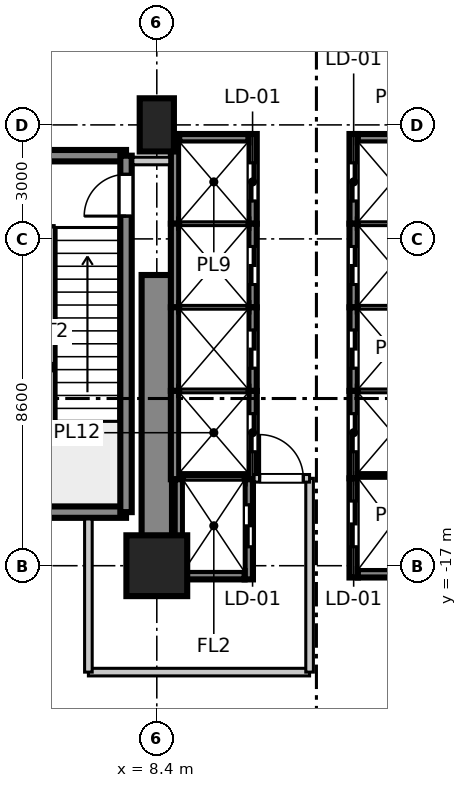
"""IFC4 building model, lengths in metres.
Left out: names, types, materials, properties, quantities, classifications, styles, units other than length and angle.
Written with IfcOpenShell. Run it as: python <this file> out.ifc"""

import sys

from ifc_helpers import new_model, si_unit, direction, frame, frame_2d, origin, origin_2d, place, context, subcontext, project, spatial, rectangle, extrude, source, transform, mapped, element, fill, save


model = new_model("IFC4")
c1 = context("Model", 3, precision=1e-05, world=origin(), true_north=direction((0.0, 1.0)))
c2 = subcontext(c1, "Body", "Model", "MODEL_VIEW")
j1 = project(units=[si_unit("LENGTHUNIT", "METRE"), si_unit("PLANEANGLEUNIT", "RADIAN")], contexts=[c1])
p1 = place(None, origin())
s1 = spatial("IfcSite", under=j1, at=p1, CompositionType="ELEMENT")
p2 = place(p1, origin())
s2 = spatial("IfcBuilding", under=s1, at=p2, CompositionType="ELEMENT")
p3 = place(p2, origin())
s3 = spatial("IfcBuildingStorey", under=s2, at=p3, CompositionType="ELEMENT", Elevation=0.0)
m1 = source(origin(), c2, "Body", "SweptSolid", [
    extrude(rectangle(XDim=1.6, YDim=1.6, at=origin_2d()), origin(), (0.0, 0.0, 1.0), 5.355),
])
p4 = place(p3, frame((8.4, -17.0, 0.0), z_axis=(0.0, 0.0, 1.0), x_axis=(1.0, 0.0, 0.0)))
e1 = element("IfcColumn", 1, at=p4, inside=s3, PredefinedType="COLUMN", context=c2, shape_type="MappedRepresentation", body=[
    mapped(m1, transform((0.0, 0.0, 0.0), scale=1.0)),
])
m2 = source(origin(), c2, "Body", "SweptSolid", [
    extrude(rectangle(XDim=0.9, YDim=1.4, at=origin_2d()), origin(), (0.0, 0.0, 1.0), 5.355),
])
p5 = place(p3, frame((8.4, -5.4, 0.0), z_axis=(0.0, 0.0, 1.0), x_axis=(1.0, 0.0, 0.0)))
e2 = element("IfcColumn", 2, at=p5, inside=s3, PredefinedType="PILASTER", context=c2, shape_type="MappedRepresentation", body=[
    mapped(m2, transform((0.0, 0.0, 0.0), scale=1.0)),
])
m3 = source(origin(), c2, "Body", "SweptSolid", [
    extrude(rectangle(XDim=7.65, YDim=0.8, at=frame_2d((3.825, 0.0))), origin(), (0.0, 0.0, 1.0), 5.08),
])
p6 = place(p3, frame((8.4, -17.0, 0.0), z_axis=(0.0, 0.0, 1.0), x_axis=(0.0, 1.0, 0.0)))
e3 = element("IfcWall", 3, at=p6, inside=s3, PredefinedType="SHEAR", context=c2, shape_type="MappedRepresentation", body=[
    mapped(m3, transform((0.0, 0.0, 0.0), scale=1.0)),
])
m4 = source(origin(), c2, "Body", "SweptSolid", [
    extrude(rectangle(XDim=3.98, YDim=0.3, at=frame_2d((1.99, 0.0))), origin(), (0.0, 0.0, 1.0), 5.08),
])
for number, where, z_axis, x_axis in (
    (4, (3.61, -15.59, 0.0), (0.0, 0.0, 1.0), (1.0, 0.0, 0.0)),
    (5, (3.61, -6.21, 0.0), (0.0, 0.0, 1.0), (1.0, 0.0, 0.0)),
):
    element("IfcWall", number, at=place(p3, frame(where, z_axis=z_axis, x_axis=x_axis)), inside=s3, PredefinedType="SHEAR", context=c2, shape_type="MappedRepresentation", body=[
        mapped(m4, transform((0.0, 0.0, 0.0), scale=1.0)),
    ])
m5 = source(origin(), c2, "Body", "SweptSolid", [
    extrude(rectangle(XDim=9.38, YDim=0.3, at=frame_2d((4.69, 0.0))), origin(), (0.0, 0.0, 1.0), 5.08),
])
p7 = place(p3, frame((7.59, -15.59, 0.0), z_axis=(0.0, 0.0, 1.0), x_axis=(0.0, 1.0, 0.0)))
e6 = element("IfcWall", 6, at=p7, inside=s3, PredefinedType="SHEAR", context=c2, shape_type="MappedRepresentation", body=[
    mapped(m5, transform((0.0, 0.0, 0.0), scale=1.0)),
])
p8 = place(p7, frame((7.79, 0.0, 0.0)))
e7 = element("IfcOpeningElement", 7, at=p8, cuts=e6, PredefinedType="OPENING", context=c2, shape_type="SweptSolid", body=[
    extrude(rectangle(XDim=1.1, YDim=2.15, at=frame_2d((0.55, 1.075))), frame((0.0, 0.16, 0.0), z_axis=(0.0, -1.0, 0.0), x_axis=(1.0, 0.0, 0.0)), (0.0, 0.0, 1.0), 0.32),
])
m6 = source(origin(), c2, "Body", "SweptSolid", [
    extrude(rectangle(XDim=2.36, YDim=0.22, at=frame_2d((1.18, 0.0))), origin(), (0.0, 0.0, 1.0), 5.08),
])
p9 = place(p3, frame((13.58, -8.0, 0.0), z_axis=(0.0, 0.0, 1.0), x_axis=(0.0, 1.0, 0.0)))
e8 = element("IfcWall", 8, at=p9, inside=s3, PredefinedType="SHEAR", context=c2, shape_type="MappedRepresentation", body=[
    mapped(m6, transform((0.0, 0.0, 0.0), scale=1.0)),
])
p10 = place(p9, frame((0.6, 0.0, 0.0)))
e9 = element("IfcOpeningElement", 9, at=p10, cuts=e8, PredefinedType="OPENING", context=c2, shape_type="SweptSolid", body=[
    extrude(rectangle(XDim=1.0, YDim=2.2, at=frame_2d((0.5, 1.1))), frame((0.0, 0.12, 0.0), z_axis=(0.0, -1.0, 0.0), x_axis=(1.0, 0.0, 0.0)), (0.0, 0.0, 1.0), 0.24),
])
m7 = source(origin(), c2, "Body", "SweptSolid", [
    extrude(rectangle(XDim=1.82, YDim=0.22, at=frame_2d((0.91, 0.0))), origin(), (0.0, 0.0, 1.0), 5.08),
])
p11 = place(p3, frame((13.69, -5.75, 0.0), z_axis=(0.0, 0.0, 1.0), x_axis=(1.0, 0.0, 0.0)))
e10 = element("IfcWall", 10, at=p11, inside=s3, PredefinedType="SHEAR", context=c2, shape_type="MappedRepresentation", body=[
    mapped(m7, transform((0.0, 0.0, 0.0), scale=1.0)),
])
m8 = source(origin(), c2, "Body", "SweptSolid", [
    extrude(rectangle(XDim=2.2, YDim=0.22, at=frame_2d((1.1, 0.0))), origin(), (0.0, 0.0, 1.0), 5.08),
])
p12 = place(p3, frame((13.58, -10.2, 0.0), z_axis=(0.0, 0.0, 1.0), x_axis=(0.0, 1.0, 0.0)))
e11 = element("IfcWall", 11, at=p12, inside=s3, PredefinedType="SHEAR", context=c2, shape_type="MappedRepresentation", body=[
    mapped(m8, transform((0.0, 0.0, 0.0), scale=1.0)),
])
p13 = place(p12, frame((0.6, 0.0, 0.0)))
e12 = element("IfcOpeningElement", 12, at=p13, cuts=e11, PredefinedType="OPENING", context=c2, shape_type="SweptSolid", body=[
    extrude(rectangle(XDim=1.0, YDim=2.2, at=frame_2d((0.5, 1.1))), frame((0.0, 0.12, 0.0), z_axis=(0.0, -1.0, 0.0), x_axis=(1.0, 0.0, 0.0)), (0.0, 0.0, 1.0), 0.24),
])
m9 = source(origin(), c2, "Body", "SweptSolid", [
    extrude(rectangle(XDim=1.82, YDim=0.22, at=frame_2d((0.91, 0.0))), origin(), (0.0, 0.0, 1.0), 5.4),
])
p14 = place(p3, frame((13.69, -8.0, 0.0), z_axis=(0.0, 0.0, 1.0), x_axis=(1.0, 0.0, 0.0)))
e13 = element("IfcWall", 13, at=p14, inside=s3, PredefinedType="SHEAR", context=c2, shape_type="MappedRepresentation", body=[
    mapped(m9, transform((0.0, 0.0, 0.0), scale=1.0)),
])
p15 = place(p3, frame((13.58, -12.4, 0.0), z_axis=(0.0, 0.0, 1.0), x_axis=(0.0, 1.0, 0.0)))
e14 = element("IfcWall", 14, at=p15, inside=s3, PredefinedType="SHEAR", context=c2, shape_type="MappedRepresentation", body=[
    mapped(m8, transform((0.0, 0.0, 0.0), scale=1.0)),
])
p16 = place(p15, frame((0.6, 0.0, 0.0)))
e15 = element("IfcOpeningElement", 15, at=p16, cuts=e14, PredefinedType="OPENING", context=c2, shape_type="SweptSolid", body=[
    extrude(rectangle(XDim=1.0, YDim=2.2, at=frame_2d((0.5, 1.1))), frame((0.0, 0.12, 0.0), z_axis=(0.0, -1.0, 0.0), x_axis=(1.0, 0.0, 0.0)), (0.0, 0.0, 1.0), 0.24),
])
p17 = place(p3, frame((13.69, -10.2, 0.0), z_axis=(0.0, 0.0, 1.0), x_axis=(1.0, 0.0, 0.0)))
e16 = element("IfcWall", 16, at=p17, inside=s3, PredefinedType="SHEAR", context=c2, shape_type="MappedRepresentation", body=[
    mapped(m9, transform((0.0, 0.0, 0.0), scale=1.0)),
])
m10 = source(origin(), c2, "Body", "SweptSolid", [
    extrude(rectangle(XDim=2.3, YDim=0.22, at=frame_2d((1.15, 0.0))), origin(), (0.0, 0.0, 1.0), 5.08),
])
p18 = place(p3, frame((13.58, -14.7, 0.0), z_axis=(0.0, 0.0, 1.0), x_axis=(0.0, 1.0, 0.0)))
e17 = element("IfcWall", 17, at=p18, inside=s3, PredefinedType="SHEAR", context=c2, shape_type="MappedRepresentation", body=[
    mapped(m10, transform((0.0, 0.0, 0.0), scale=1.0)),
])
p19 = place(p18, frame((0.7, 0.0, 0.0)))
e18 = element("IfcOpeningElement", 18, at=p19, cuts=e17, PredefinedType="OPENING", context=c2, shape_type="SweptSolid", body=[
    extrude(rectangle(XDim=1.0, YDim=2.2, at=frame_2d((0.5, 1.1))), frame((0.0, 0.12, 0.0), z_axis=(0.0, -1.0, 0.0), x_axis=(1.0, 0.0, 0.0)), (0.0, 0.0, 1.0), 0.24),
])
p20 = place(p3, frame((13.69, -12.4, 0.0), z_axis=(0.0, 0.0, 1.0), x_axis=(1.0, 0.0, 0.0)))
e19 = element("IfcWall", 19, at=p20, inside=s3, PredefinedType="SHEAR", context=c2, shape_type="MappedRepresentation", body=[
    mapped(m9, transform((0.0, 0.0, 0.0), scale=1.0)),
])
p21 = place(p3, frame((8.88, -8.0, 0.0), z_axis=(0.0, 0.0, 1.0), x_axis=(0.0, 1.0, 0.0)))
e20 = element("IfcWall", 20, at=p21, inside=s3, PredefinedType="SHEAR", context=c2, shape_type="MappedRepresentation", body=[
    mapped(m6, transform((0.0, 0.0, 0.0), scale=1.0)),
])
p22 = place(p3, frame((10.92, -8.0, 0.0), z_axis=(0.0, 0.0, 1.0), x_axis=(0.0, 1.0, 0.0)))
e21 = element("IfcWall", 21, at=p22, inside=s3, PredefinedType="SHEAR", context=c2, shape_type="MappedRepresentation", body=[
    mapped(m6, transform((0.0, 0.0, 0.0), scale=1.0)),
])
p23 = place(p22, frame((0.6, 0.0, 0.0)))
e22 = element("IfcOpeningElement", 22, at=p23, cuts=e21, PredefinedType="OPENING", context=c2, shape_type="SweptSolid", body=[
    extrude(rectangle(XDim=1.0, YDim=2.2, at=frame_2d((0.5, 1.1))), frame((0.0, 0.12, 0.0), z_axis=(0.0, -1.0, 0.0), x_axis=(1.0, 0.0, 0.0)), (0.0, 0.0, 1.0), 0.24),
])
p24 = place(p3, frame((8.99, -5.75, 0.0), z_axis=(0.0, 0.0, 1.0), x_axis=(1.0, 0.0, 0.0)))
e23 = element("IfcWall", 23, at=p24, inside=s3, PredefinedType="SHEAR", context=c2, shape_type="MappedRepresentation", body=[
    mapped(m7, transform((0.0, 0.0, 0.0), scale=1.0)),
])
p25 = place(p3, frame((8.88, -10.2, 0.0), z_axis=(0.0, 0.0, 1.0), x_axis=(0.0, 1.0, 0.0)))
e24 = element("IfcWall", 24, at=p25, inside=s3, PredefinedType="SHEAR", context=c2, shape_type="MappedRepresentation", body=[
    mapped(m8, transform((0.0, 0.0, 0.0), scale=1.0)),
])
p26 = place(p3, frame((10.92, -10.2, 0.0), z_axis=(0.0, 0.0, 1.0), x_axis=(0.0, 1.0, 0.0)))
e25 = element("IfcWall", 25, at=p26, inside=s3, PredefinedType="SHEAR", context=c2, shape_type="MappedRepresentation", body=[
    mapped(m8, transform((0.0, 0.0, 0.0), scale=1.0)),
])
p27 = place(p26, frame((0.6, 0.0, 0.0)))
e26 = element("IfcOpeningElement", 26, at=p27, cuts=e25, PredefinedType="OPENING", context=c2, shape_type="SweptSolid", body=[
    extrude(rectangle(XDim=1.0, YDim=2.2, at=frame_2d((0.5, 1.1))), frame((0.0, 0.12, 0.0), z_axis=(0.0, -1.0, 0.0), x_axis=(1.0, 0.0, 0.0)), (0.0, 0.0, 1.0), 0.24),
])
p28 = place(p3, frame((8.99, -8.0, 0.0), z_axis=(0.0, 0.0, 1.0), x_axis=(1.0, 0.0, 0.0)))
e27 = element("IfcWall", 27, at=p28, inside=s3, PredefinedType="SHEAR", context=c2, shape_type="MappedRepresentation", body=[
    mapped(m9, transform((0.0, 0.0, 0.0), scale=1.0)),
])
p29 = place(p3, frame((8.88, -12.4, 0.0), z_axis=(0.0, 0.0, 1.0), x_axis=(0.0, 1.0, 0.0)))
e28 = element("IfcWall", 28, at=p29, inside=s3, PredefinedType="SHEAR", context=c2, shape_type="MappedRepresentation", body=[
    mapped(m8, transform((0.0, 0.0, 0.0), scale=1.0)),
])
p30 = place(p3, frame((10.92, -12.4, 0.0), z_axis=(0.0, 0.0, 1.0), x_axis=(0.0, 1.0, 0.0)))
e29 = element("IfcWall", 29, at=p30, inside=s3, PredefinedType="SHEAR", context=c2, shape_type="MappedRepresentation", body=[
    mapped(m8, transform((0.0, 0.0, 0.0), scale=1.0)),
])
p31 = place(p30, frame((0.6, 0.0, 0.0)))
e30 = element("IfcOpeningElement", 30, at=p31, cuts=e29, PredefinedType="OPENING", context=c2, shape_type="SweptSolid", body=[
    extrude(rectangle(XDim=1.0, YDim=2.2, at=frame_2d((0.5, 1.1))), frame((0.0, 0.12, 0.0), z_axis=(0.0, -1.0, 0.0), x_axis=(1.0, 0.0, 0.0)), (0.0, 0.0, 1.0), 0.24),
])
p32 = place(p3, frame((8.99, -10.2, 0.0), z_axis=(0.0, 0.0, 1.0), x_axis=(1.0, 0.0, 0.0)))
e31 = element("IfcWall", 31, at=p32, inside=s3, PredefinedType="SHEAR", context=c2, shape_type="MappedRepresentation", body=[
    mapped(m9, transform((0.0, 0.0, 0.0), scale=1.0)),
])
m11 = source(origin(), c2, "Body", "SweptSolid", [
    extrude(rectangle(XDim=2.325, YDim=0.22, at=frame_2d((1.163, 0.0))), origin(), (0.0, 0.0, 1.0), 5.08),
])
p33 = place(p3, frame((8.88, -14.725, 0.0), z_axis=(0.0, 0.0, 1.0), x_axis=(0.0, 1.0, 0.0)))
e32 = element("IfcWall", 32, at=p33, inside=s3, PredefinedType="SHEAR", context=c2, shape_type="MappedRepresentation", body=[
    mapped(m11, transform((0.0, 0.0, 0.0), scale=1.0)),
])
p34 = place(p3, frame((10.92, -14.725, 0.0), z_axis=(0.0, 0.0, 1.0), x_axis=(0.0, 1.0, 0.0)))
e33 = element("IfcWall", 33, at=p34, inside=s3, PredefinedType="SHEAR", context=c2, shape_type="MappedRepresentation", body=[
    mapped(m11, transform((0.0, 0.0, 0.0), scale=1.0)),
])
p35 = place(p34, frame((0.725, 0.0, 0.0)))
e34 = element("IfcOpeningElement", 34, at=p35, cuts=e33, PredefinedType="OPENING", context=c2, shape_type="SweptSolid", body=[
    extrude(rectangle(XDim=1.0, YDim=2.2, at=frame_2d((0.5, 1.1))), frame((0.0, 0.12, 0.0), z_axis=(0.0, -1.0, 0.0), x_axis=(1.0, 0.0, 0.0)), (0.0, 0.0, 1.0), 0.24),
])
p36 = place(p3, frame((8.99, -12.4, 0.0), z_axis=(0.0, 0.0, 1.0), x_axis=(1.0, 0.0, 0.0)))
e35 = element("IfcWall", 35, at=p36, inside=s3, PredefinedType="SHEAR", context=c2, shape_type="MappedRepresentation", body=[
    mapped(m9, transform((0.0, 0.0, 0.0), scale=1.0)),
])
m12 = source(origin(), c2, "Body", "SweptSolid", [
    extrude(rectangle(XDim=2.635, YDim=0.22, at=frame_2d((1.317, 0.0))), origin(), (0.0, 0.0, 1.0), 5.08),
])
p37 = place(p3, frame((8.98, -17.36, 0.0), z_axis=(0.0, 0.0, 1.0), x_axis=(0.0, 1.0, 0.0)))
e36 = element("IfcWall", 36, at=p37, inside=s3, PredefinedType="SHEAR", context=c2, shape_type="MappedRepresentation", body=[
    mapped(m12, transform((0.0, 0.0, 0.0), scale=1.0)),
])
p38 = place(p3, frame((10.82, -17.36, 0.0), z_axis=(0.0, 0.0, 1.0), x_axis=(0.0, 1.0, 0.0)))
e37 = element("IfcWall", 37, at=p38, inside=s3, PredefinedType="SHEAR", context=c2, shape_type="MappedRepresentation", body=[
    mapped(m12, transform((0.0, 0.0, 0.0), scale=1.0)),
])
p39 = place(p38, frame((0.86, 0.0, 0.0)))
e38 = element("IfcOpeningElement", 38, at=p39, cuts=e37, PredefinedType="OPENING", context=c2, shape_type="SweptSolid", body=[
    extrude(rectangle(XDim=1.1, YDim=2.2, at=frame_2d((0.55, 1.1))), frame((0.0, 0.12, 0.0), z_axis=(0.0, -1.0, 0.0), x_axis=(1.0, 0.0, 0.0)), (0.0, 0.0, 1.0), 0.24),
])
m13 = source(origin(), c2, "Body", "SweptSolid", [
    extrude(rectangle(XDim=1.62, YDim=0.22, at=frame_2d((0.81, 0.0))), origin(), (0.0, 0.0, 1.0), 5.08),
])
p40 = place(p3, frame((9.09, -17.25, 0.0), z_axis=(0.0, 0.0, 1.0), x_axis=(1.0, 0.0, 0.0)))
e39 = element("IfcWall", 39, at=p40, inside=s3, PredefinedType="SHEAR", context=c2, shape_type="MappedRepresentation", body=[
    mapped(m13, transform((0.0, 0.0, 0.0), scale=1.0)),
])
m14 = source(origin(), c2, "Body", "SweptSolid", [
    extrude(rectangle(XDim=1.62, YDim=0.22, at=frame_2d((0.81, 0.0))), origin(), (0.0, 0.0, 1.0), 5.4),
])
p41 = place(p3, frame((9.09, -14.725, 0.0), z_axis=(0.0, 0.0, 1.0), x_axis=(1.0, 0.0, 0.0)))
e40 = element("IfcWall", 40, at=p41, inside=s3, PredefinedType="SHEAR", context=c2, shape_type="MappedRepresentation", body=[
    mapped(m14, transform((0.0, 0.0, 0.0), scale=1.0)),
])
m15 = source(origin(), c2, "Body", "SweptSolid", [
    extrude(rectangle(XDim=2.61, YDim=0.22, at=frame_2d((1.305, 0.0))), origin(), (0.0, 0.0, 1.0), 5.08),
])
p42 = place(p3, frame((13.58, -17.31, 0.0), z_axis=(0.0, 0.0, 1.0), x_axis=(0.0, 1.0, 0.0)))
e41 = element("IfcWall", 41, at=p42, inside=s3, PredefinedType="SHEAR", context=c2, shape_type="MappedRepresentation", body=[
    mapped(m15, transform((0.0, 0.0, 0.0), scale=1.0)),
])
p43 = place(p42, frame((0.81, 0.0, 0.0)))
e42 = element("IfcOpeningElement", 42, at=p43, cuts=e41, PredefinedType="OPENING", context=c2, shape_type="SweptSolid", body=[
    extrude(rectangle(XDim=1.2, YDim=2.2, at=frame_2d((0.6, 1.1))), frame((0.0, 0.12, 0.0), z_axis=(0.0, -1.0, 0.0), x_axis=(1.0, 0.0, 0.0)), (0.0, 0.0, 1.0), 0.24),
])
p44 = place(p3, frame((13.69, -17.2, 0.0), z_axis=(0.0, 0.0, 1.0), x_axis=(1.0, 0.0, 0.0)))
e43 = element("IfcWall", 43, at=p44, inside=s3, PredefinedType="SHEAR", context=c2, shape_type="MappedRepresentation", body=[
    mapped(m7, transform((0.0, 0.0, 0.0), scale=1.0)),
])
p45 = place(p3, frame((13.69, -14.7, 0.0), z_axis=(0.0, 0.0, 1.0), x_axis=(1.0, 0.0, 0.0)))
e44 = element("IfcWall", 44, at=p45, inside=s3, PredefinedType="SHEAR", context=c2, shape_type="MappedRepresentation", body=[
    mapped(m9, transform((0.0, 0.0, 0.0), scale=1.0)),
])
m16 = source(origin(), c2, "Body", "SweptSolid", [
    extrude(rectangle(XDim=5.82, YDim=0.2, at=frame_2d((2.91, 0.0))), origin(), (0.0, 0.0, 1.0), 3.4),
])
p46 = place(p3, frame((6.6, -19.8, 0.0), z_axis=(0.0, 0.0, 1.0), x_axis=(1.0, 0.0, 0.0)))
e45 = element("IfcWall", 45, at=p46, inside=s3, PredefinedType="PARTITIONING", context=c2, shape_type="MappedRepresentation", body=[
    mapped(m16, transform((0.0, 0.0, 0.0), scale=1.0)),
])
m17 = source(origin(), c2, "Body", "SweptSolid", [
    extrude(rectangle(XDim=4.03, YDim=0.2, at=frame_2d((2.015, 0.0))), origin(), (0.0, 0.0, 1.0), 3.4),
])
p47 = place(p3, frame((6.6, -19.8, 0.0), z_axis=(0.0, 0.0, 1.0), x_axis=(0.0, 1.0, 0.0)))
e46 = element("IfcWall", 46, at=p47, inside=s3, PredefinedType="PARTITIONING", context=c2, shape_type="MappedRepresentation", body=[
    mapped(m17, transform((0.0, 0.0, 0.0), scale=1.0)),
])
m18 = source(origin(), c2, "Body", "SweptSolid", [
    extrude(rectangle(XDim=5.1, YDim=0.2, at=frame_2d((2.55, 0.0))), origin(), (0.0, 0.0, 1.0), 3.4),
])
p48 = place(p3, frame((12.42, -19.8, 0.0), z_axis=(0.0, 0.0, 1.0), x_axis=(0.0, 1.0, 0.0)))
e47 = element("IfcWall", 47, at=p48, inside=s3, PredefinedType="PARTITIONING", context=c2, shape_type="MappedRepresentation", body=[
    mapped(m18, transform((0.0, 0.0, 0.0), scale=1.0)),
])
m19 = source(origin(), c2, "Body", "SweptSolid", [
    extrude(rectangle(XDim=1.46, YDim=0.2, at=frame_2d((0.73, 0.0))), origin(), (0.0, 0.0, 1.0), 3.4),
])
p49 = place(p3, frame((10.96, -14.7, 0.0), z_axis=(0.0, 0.0, 1.0), x_axis=(1.0, 0.0, 0.0)))
e48 = element("IfcWall", 48, at=p49, inside=s3, PredefinedType="PARTITIONING", context=c2, shape_type="MappedRepresentation", body=[
    mapped(m19, transform((0.0, 0.0, 0.0), scale=1.0)),
])
p50 = place(p49, frame((0.145, 0.0, 0.0)))
e49 = element("IfcOpeningElement", 49, at=p50, cuts=e48, PredefinedType="OPENING", context=c2, shape_type="SweptSolid", body=[
    extrude(rectangle(XDim=1.15, YDim=2.15, at=frame_2d((0.575, 1.075))), frame((0.0, 0.11, 0.0), z_axis=(0.0, -1.0, 0.0), x_axis=(1.0, 0.0, 0.0)), (0.0, 0.0, 1.0), 0.22),
])
m20 = source(origin(), c2, "Body", "SweptSolid", [
    extrude(rectangle(XDim=0.97, YDim=0.2, at=frame_2d((0.485, 0.0))), origin(), (0.0, 0.0, 1.0), 3.4),
])
p51 = place(p3, frame((7.77, -6.35, 0.0), z_axis=(0.0, 0.0, 1.0), x_axis=(1.0, 0.0, 0.0)))
e50 = element("IfcWall", 50, at=p51, inside=s3, PredefinedType="PARTITIONING", context=c2, shape_type="MappedRepresentation", body=[
    mapped(m20, transform((0.0, 0.0, 0.0), scale=1.0)),
])
m21 = source(origin(), c2, "Body", "SweptSolid", [
    extrude(rectangle(XDim=1.1, YDim=2.15, at=frame_2d((0.55, 1.075))), frame((0.0, 0.025, 0.0), z_axis=(0.0, -1.0, 0.0), x_axis=(1.0, 0.0, 0.0)), (0.0, 0.0, 1.0), 0.05),
])
p52 = place(p8, frame((1.1, 0.0, 0.0), z_axis=(0.0, 0.0, 1.0), x_axis=(-1.0, 0.0, 0.0)))
e51 = element("IfcDoor", 51, at=p52, inside=s3, OperationType="SINGLE_SWING_LEFT", PredefinedType="DOOR", context=c2, shape_type="MappedRepresentation", body=[
    mapped(m21, transform((0.0, 0.0, 0.0), scale=1.0)),
])
fill(e7, e51)
m22 = source(origin(), c2, "Body", "SweptSolid", [
    extrude(rectangle(XDim=1.0, YDim=2.2, at=frame_2d((0.5, 1.1))), frame((0.0, 0.025, 0.0), z_axis=(0.0, -1.0, 0.0), x_axis=(1.0, 0.0, 0.0)), (0.0, 0.0, 1.0), 0.05),
])
p53 = place(p10, origin())
e52 = element("IfcDoor", 52, at=p53, inside=s3, OperationType="DOUBLE_DOOR_SLIDING", PredefinedType="DOOR", context=c2, shape_type="MappedRepresentation", body=[
    mapped(m22, transform((0.0, 0.0, 0.0), scale=1.0)),
])
fill(e9, e52)
p54 = place(p13, origin())
e53 = element("IfcDoor", 53, at=p54, inside=s3, OperationType="DOUBLE_DOOR_SLIDING", PredefinedType="DOOR", context=c2, shape_type="MappedRepresentation", body=[
    mapped(m22, transform((0.0, 0.0, 0.0), scale=1.0)),
])
fill(e12, e53)
p55 = place(p16, origin())
e54 = element("IfcDoor", 54, at=p55, inside=s3, OperationType="DOUBLE_DOOR_SLIDING", PredefinedType="DOOR", context=c2, shape_type="MappedRepresentation", body=[
    mapped(m22, transform((0.0, 0.0, 0.0), scale=1.0)),
])
fill(e15, e54)
p56 = place(p19, origin())
e55 = element("IfcDoor", 55, at=p56, inside=s3, OperationType="DOUBLE_DOOR_SLIDING", PredefinedType="DOOR", context=c2, shape_type="MappedRepresentation", body=[
    mapped(m22, transform((0.0, 0.0, 0.0), scale=1.0)),
])
fill(e18, e55)
p57 = place(p23, frame((1.0, 0.0, 0.0), z_axis=(0.0, 0.0, 1.0), x_axis=(-1.0, 0.0, 0.0)))
e56 = element("IfcDoor", 56, at=p57, inside=s3, OperationType="DOUBLE_DOOR_SLIDING", PredefinedType="DOOR", context=c2, shape_type="MappedRepresentation", body=[
    mapped(m22, transform((0.0, 0.0, 0.0), scale=1.0)),
])
fill(e22, e56)
p58 = place(p27, frame((1.0, 0.0, 0.0), z_axis=(0.0, 0.0, 1.0), x_axis=(-1.0, 0.0, 0.0)))
e57 = element("IfcDoor", 57, at=p58, inside=s3, OperationType="DOUBLE_DOOR_SLIDING", PredefinedType="DOOR", context=c2, shape_type="MappedRepresentation", body=[
    mapped(m22, transform((0.0, 0.0, 0.0), scale=1.0)),
])
fill(e26, e57)
p59 = place(p31, frame((1.0, 0.0, 0.0), z_axis=(0.0, 0.0, 1.0), x_axis=(-1.0, 0.0, 0.0)))
e58 = element("IfcDoor", 58, at=p59, inside=s3, OperationType="DOUBLE_DOOR_SLIDING", PredefinedType="DOOR", context=c2, shape_type="MappedRepresentation", body=[
    mapped(m22, transform((0.0, 0.0, 0.0), scale=1.0)),
])
fill(e30, e58)
p60 = place(p35, frame((1.0, 0.0, 0.0), z_axis=(0.0, 0.0, 1.0), x_axis=(-1.0, 0.0, 0.0)))
e59 = element("IfcDoor", 59, at=p60, inside=s3, OperationType="DOUBLE_DOOR_SLIDING", PredefinedType="DOOR", context=c2, shape_type="MappedRepresentation", body=[
    mapped(m22, transform((0.0, 0.0, 0.0), scale=1.0)),
])
fill(e34, e59)
m23 = source(origin(), c2, "Body", "SweptSolid", [
    extrude(rectangle(XDim=1.1, YDim=2.2, at=frame_2d((0.55, 1.1))), frame((0.0, 0.025, 0.0), z_axis=(0.0, -1.0, 0.0), x_axis=(1.0, 0.0, 0.0)), (0.0, 0.0, 1.0), 0.05),
])
p61 = place(p39, frame((1.1, 0.0, 0.0), z_axis=(0.0, 0.0, 1.0), x_axis=(-1.0, 0.0, 0.0)))
e60 = element("IfcDoor", 60, at=p61, inside=s3, OperationType="DOUBLE_DOOR_SLIDING", PredefinedType="DOOR", context=c2, shape_type="MappedRepresentation", body=[
    mapped(m23, transform((0.0, 0.0, 0.0), scale=1.0)),
])
fill(e38, e60)
m24 = source(origin(), c2, "Body", "SweptSolid", [
    extrude(rectangle(XDim=1.2, YDim=2.2, at=frame_2d((0.6, 1.1))), frame((0.0, 0.025, 0.0), z_axis=(0.0, -1.0, 0.0), x_axis=(1.0, 0.0, 0.0)), (0.0, 0.0, 1.0), 0.05),
])
p62 = place(p43, origin())
e61 = element("IfcDoor", 61, at=p62, inside=s3, OperationType="DOUBLE_DOOR_SLIDING", PredefinedType="DOOR", context=c2, shape_type="MappedRepresentation", body=[
    mapped(m24, transform((0.0, 0.0, 0.0), scale=1.0)),
])
fill(e42, e61)
m25 = source(origin(), c2, "Body", "SweptSolid", [
    extrude(rectangle(XDim=1.15, YDim=2.15, at=frame_2d((0.575, 1.075))), frame((0.0, 0.025, 0.0), z_axis=(0.0, -1.0, 0.0), x_axis=(1.0, 0.0, 0.0)), (0.0, 0.0, 1.0), 0.05),
])
p63 = place(p50, origin())
e62 = element("IfcDoor", 62, at=p63, inside=s3, OperationType="SINGLE_SWING_LEFT", PredefinedType="DOOR", context=c2, shape_type="MappedRepresentation", body=[
    mapped(m25, transform((0.0, 0.0, 0.0), scale=1.0)),
])
fill(e49, e62)
save(model, sys.argv[1])
